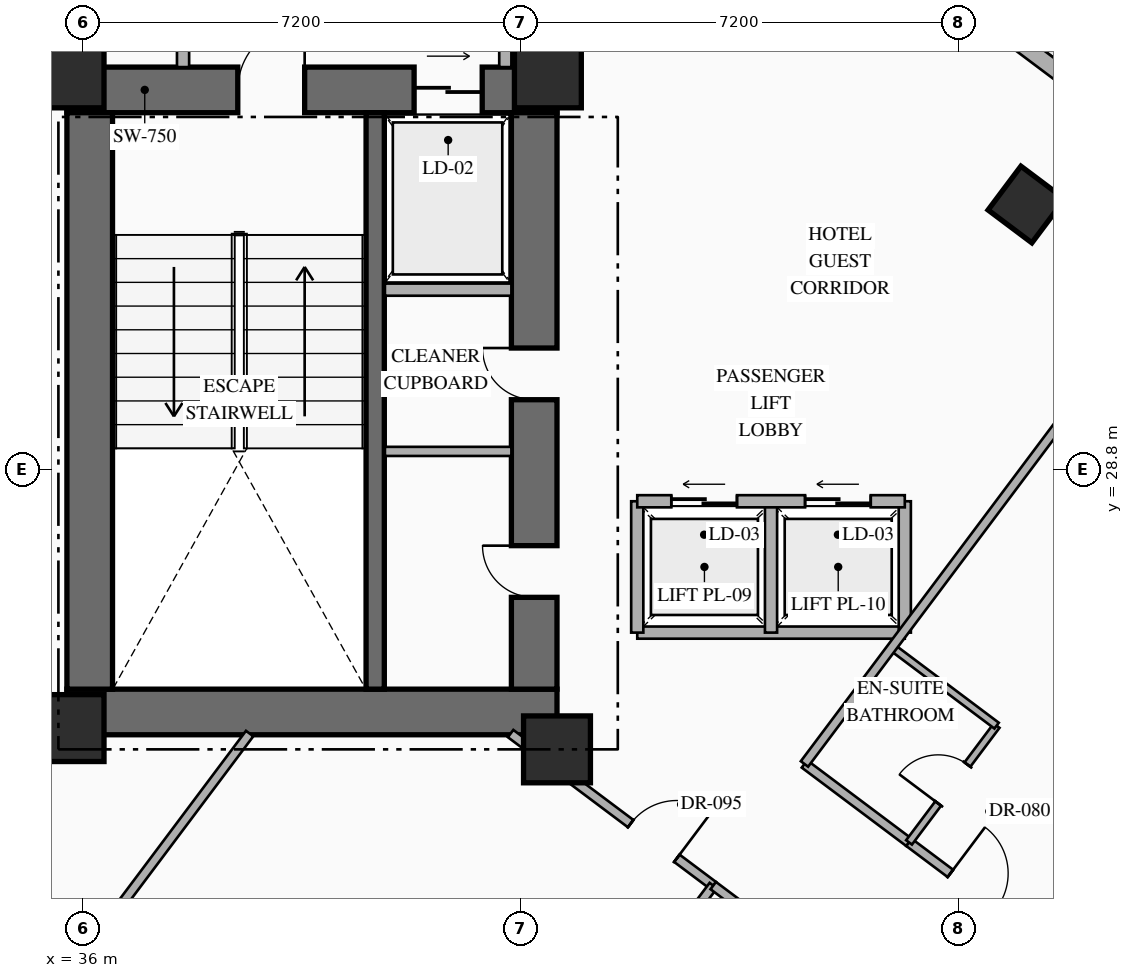
"""IFC4 building model, lengths in metres.
Left out: names, types, materials, properties, quantities, classifications, styles, units other than length and angle.
Written with IfcOpenShell. Run it as: python <this file> out.ifc"""

import sys

from ifc_helpers import new_model, si_unit, direction, frame, frame_2d, origin, origin_2d, place, context, subcontext, project, spatial, rectangle, hollow_rectangle, extrude, element, fill, save


model = new_model("IFC4")
c1 = context("Model", 3, precision=1e-05, world=origin(), true_north=direction((0.0, 1.0)))
c2 = subcontext(c1, "Body", "Model", "MODEL_VIEW")
j1 = project(units=[si_unit("LENGTHUNIT", "METRE"), si_unit("PLANEANGLEUNIT", "RADIAN")], contexts=[c1])
p1 = place(None, origin())
s1 = spatial("IfcSite", under=j1, at=p1, CompositionType="ELEMENT")
p2 = place(p1, origin())
s2 = spatial("IfcBuilding", under=s1, at=p2, CompositionType="ELEMENT")
p3 = place(p2, frame((0.0, 0.0, 74.6)))
s3 = spatial("IfcBuildingStorey", under=s2, at=p3, CompositionType="ELEMENT", Elevation=74.6)
p4 = place(p3, frame((35.74, 24.815, 0.0), z_axis=(0.0, 0.0, 1.0), x_axis=(1.0, 0.0, 0.0)))
e1 = element("IfcWall", 1, at=p4, inside=s3, PredefinedType="SHEAR", context=c2, shape_type="SweptSolid", body=[
    extrude(rectangle(XDim=8.06, YDim=0.75, at=frame_2d((4.03, 0.0))), origin(), (0.0, 0.0, 1.0), 3.35),
])
p5 = place(p3, frame((35.74, 35.045, 0.0), z_axis=(0.0, 0.0, 1.0), x_axis=(1.0, 0.0, 0.0)))
e2 = element("IfcWall", 2, at=p5, inside=s3, PredefinedType="SHEAR", context=c2, shape_type="SweptSolid", body=[
    extrude(rectangle(XDim=8.06, YDim=0.75, at=frame_2d((4.03, 0.0))), origin(), (0.0, 0.0, 1.0), 3.35),
])
p6 = place(p5, frame((2.81, 0.0, 0.0)))
e3 = element("IfcOpeningElement", 3, at=p6, cuts=e2, PredefinedType="OPENING", context=c2, shape_type="SweptSolid", body=[
    extrude(rectangle(XDim=1.1, YDim=2.2, at=frame_2d((0.55, 1.1))), frame((0.0, 0.385, 0.0), z_axis=(0.0, -1.0, 0.0), x_axis=(1.0, 0.0, 0.0)), (0.0, 0.0, 1.0), 0.77),
])
p7 = place(p5, frame((5.71, 0.0, 0.0)))
e4 = element("IfcOpeningElement", 4, at=p7, cuts=e2, PredefinedType="OPENING", context=c2, shape_type="SweptSolid", body=[
    extrude(rectangle(XDim=1.12, YDim=2.15, at=frame_2d((0.56, 1.075))), frame((0.0, 0.385, 0.0), z_axis=(0.0, -1.0, 0.0), x_axis=(1.0, 0.0, 0.0)), (0.0, 0.0, 1.0), 0.77),
])
p8 = place(p3, frame((36.115, 25.19, 0.0), z_axis=(0.0, 0.0, 1.0), x_axis=(0.0, 1.0, 0.0)))
e5 = element("IfcWall", 5, at=p8, inside=s3, PredefinedType="SHEAR", context=c2, shape_type="SweptSolid", body=[
    extrude(rectangle(XDim=9.48, YDim=0.75, at=frame_2d((4.74, 0.0))), origin(), (0.0, 0.0, 1.0), 3.35),
])
p9 = place(p3, frame((43.425, 25.19, 0.0), z_axis=(0.0, 0.0, 1.0), x_axis=(0.0, 1.0, 0.0)))
e6 = element("IfcWall", 6, at=p9, inside=s3, PredefinedType="SHEAR", context=c2, shape_type="SweptSolid", body=[
    extrude(rectangle(XDim=9.48, YDim=0.75, at=frame_2d((4.74, 0.0))), origin(), (0.0, 0.0, 1.0), 3.35),
])
p10 = place(p9, frame((1.51, 0.0, 0.0)))
e7 = element("IfcOpeningElement", 7, at=p10, cuts=e6, PredefinedType="OPENING", context=c2, shape_type="SweptSolid", body=[
    extrude(rectangle(XDim=0.85, YDim=2.08, at=frame_2d((0.425, 1.04))), frame((0.0, 0.385, 0.0), z_axis=(0.0, -1.0, 0.0), x_axis=(1.0, 0.0, 0.0)), (0.0, 0.0, 1.0), 0.77),
])
p11 = place(p9, frame((4.76, 0.0, 0.0)))
e8 = element("IfcOpeningElement", 8, at=p11, cuts=e6, PredefinedType="OPENING", context=c2, shape_type="SweptSolid", body=[
    extrude(rectangle(XDim=0.85, YDim=2.08, at=frame_2d((0.425, 1.04))), frame((0.0, 0.385, 0.0), z_axis=(0.0, -1.0, 0.0), x_axis=(1.0, 0.0, 0.0)), (0.0, 0.0, 1.0), 0.77),
])
p12 = place(p3, frame((40.81, 25.19, 0.0), z_axis=(0.0, 0.0, 1.0), x_axis=(0.0, 1.0, 0.0)))
e9 = element("IfcWall", 9, at=p12, inside=s3, PredefinedType="SHEAR", context=c2, shape_type="SweptSolid", body=[
    extrude(rectangle(XDim=9.48, YDim=0.3, at=frame_2d((4.74, 0.0))), origin(), (0.0, 0.0, 1.0), 3.35),
])
for number, where, z_axis, x_axis in (
    (10, (35.8, 24.55, 0.0), (0.0, 0.0, 1.0), (1.0, 0.0, 0.0)),
    (11, (43.8, 24.2, 0.0), (0.0, 0.0, 1.0), (1.0, 0.0, 0.0)),
    (12, (35.8, 35.3, 0.0), (0.0, 0.0, 1.0), (1.0, 0.0, 0.0)),
    (13, (43.65, 35.3, 0.0), (0.0, 0.0, 1.0), (1.0, 0.0, 0.0)),
):
    element("IfcColumn", number, at=place(p3, frame(where, z_axis=z_axis, x_axis=x_axis)), inside=s3, PredefinedType="COLUMN", context=c2, shape_type="SweptSolid", body=[
        extrude(rectangle(XDim=1.1, YDim=1.1, at=origin_2d()), origin(), (0.0, 0.0, 1.0), 3.35),
    ])
p13 = place(p3, frame((51.52, 33.16, 0.0), z_axis=(0.0, 0.0, 1.0), x_axis=(0.799999996291, -0.600000004945, 0.0)))
e14 = element("IfcColumn", 14, at=p13, inside=s3, PredefinedType="COLUMN", context=c2, shape_type="SweptSolid", body=[
    extrude(hollow_rectangle(XDim=0.9, YDim=0.9, WallThickness=0.036, at=origin_2d()), origin(), (0.0, 0.0, 1.0), 3.35),
])
p14 = place(p3, frame((44.86, 40.73, 0.0), z_axis=(0.0, 0.0, 1.0), x_axis=(0.800006902154, -0.599990797017, 0.0)))
e15 = element("IfcWall", 15, at=p14, inside=s3, PredefinedType="STANDARD", context=c2, shape_type="SweptSolid", body=[
    extrude(rectangle(XDim=29.712, YDim=0.28, at=frame_2d((14.856, 0.0))), origin(), (0.0, 0.0, 1.0), 3.13),
])
p15 = place(p14, frame((14.249, 0.0, 0.0)))
e16 = element("IfcOpeningElement", 16, at=p15, cuts=e15, PredefinedType="OPENING", context=c2, shape_type="SweptSolid", body=[
    extrude(rectangle(XDim=1.1, YDim=2.2, at=frame_2d((0.55, 1.1))), frame((0.0, 0.15, 0.0), z_axis=(0.0, -1.0, 0.0), x_axis=(1.0, 0.0, 0.0)), (0.0, 0.0, 1.0), 0.3),
])
p16 = place(p14, frame((1.612, 0.0, 0.85)))
e17 = element("IfcOpeningElement", 17, at=p16, cuts=e15, PredefinedType="OPENING", context=c2, shape_type="SweptSolid", body=[
    extrude(rectangle(XDim=1.4, YDim=1.8, at=frame_2d((0.7, 0.9))), frame((0.0, 0.15, 0.0), z_axis=(0.0, -1.0, 0.0), x_axis=(1.0, 0.0, 0.0)), (0.0, 0.0, 1.0), 0.3),
])
p17 = place(p14, frame((5.667, 0.0, 0.85)))
e18 = element("IfcOpeningElement", 18, at=p17, cuts=e15, PredefinedType="OPENING", context=c2, shape_type="SweptSolid", body=[
    extrude(rectangle(XDim=1.4, YDim=1.8, at=frame_2d((0.7, 0.9))), frame((0.0, 0.15, 0.0), z_axis=(0.0, -1.0, 0.0), x_axis=(1.0, 0.0, 0.0)), (0.0, 0.0, 1.0), 0.3),
])
p18 = place(p14, frame((9.912, 0.0, 0.85)))
e19 = element("IfcOpeningElement", 19, at=p18, cuts=e15, PredefinedType="OPENING", context=c2, shape_type="SweptSolid", body=[
    extrude(rectangle(XDim=1.4, YDim=1.8, at=frame_2d((0.7, 0.9))), frame((0.0, 0.15, 0.0), z_axis=(0.0, -1.0, 0.0), x_axis=(1.0, 0.0, 0.0)), (0.0, 0.0, 1.0), 0.3),
])
p19 = place(p14, frame((19.528, 0.0, 0.85)))
e20 = element("IfcOpeningElement", 20, at=p19, cuts=e15, PredefinedType="OPENING", context=c2, shape_type="SweptSolid", body=[
    extrude(rectangle(XDim=1.4, YDim=1.8, at=frame_2d((0.7, 0.9))), frame((0.0, 0.15, 0.0), z_axis=(0.0, -1.0, 0.0), x_axis=(1.0, 0.0, 0.0)), (0.0, 0.0, 1.0), 0.3),
])
p20 = place(p14, frame((23.451, 0.0, 0.85)))
e21 = element("IfcOpeningElement", 21, at=p20, cuts=e15, PredefinedType="OPENING", context=c2, shape_type="SweptSolid", body=[
    extrude(rectangle(XDim=1.4, YDim=1.8, at=frame_2d((0.7, 0.9))), frame((0.0, 0.15, 0.0), z_axis=(0.0, -1.0, 0.0), x_axis=(1.0, 0.0, 0.0)), (0.0, 0.0, 1.0), 0.3),
])
p21 = place(p14, frame((27.852, 0.0, 0.85)))
e22 = element("IfcOpeningElement", 22, at=p21, cuts=e15, PredefinedType="OPENING", context=c2, shape_type="SweptSolid", body=[
    extrude(rectangle(XDim=1.4, YDim=1.8, at=frame_2d((0.7, 0.9))), frame((0.0, 0.15, 0.0), z_axis=(0.0, -1.0, 0.0), x_axis=(1.0, 0.0, 0.0)), (0.0, 0.0, 1.0), 0.3),
])
p22 = place(p3, frame((53.318, 2.487, 0.0), z_axis=(0.0, 0.0, 1.0), x_axis=(-0.800004174678, 0.599994433723, 0.0)))
e23 = element("IfcWall", 23, at=p22, inside=s3, PredefinedType="STANDARD", context=c2, shape_type="SweptSolid", body=[
    extrude(rectangle(XDim=35.089, YDim=0.28, at=frame_2d((17.544, 0.0))), origin(), (0.0, 0.0, 1.0), 3.13),
])
p23 = place(p22, frame((1.931, 0.0, 0.85)))
e24 = element("IfcOpeningElement", 24, at=p23, cuts=e23, PredefinedType="OPENING", context=c2, shape_type="SweptSolid", body=[
    extrude(rectangle(XDim=1.4, YDim=1.8, at=frame_2d((0.7, 0.9))), frame((0.0, 0.15, 0.0), z_axis=(0.0, -1.0, 0.0), x_axis=(1.0, 0.0, 0.0)), (0.0, 0.0, 1.0), 0.3),
])
p24 = place(p22, frame((6.819, 0.0, 0.85)))
e25 = element("IfcOpeningElement", 25, at=p24, cuts=e23, PredefinedType="OPENING", context=c2, shape_type="SweptSolid", body=[
    extrude(rectangle(XDim=1.4, YDim=1.8, at=frame_2d((0.7, 0.9))), frame((0.0, 0.15, 0.0), z_axis=(0.0, -1.0, 0.0), x_axis=(1.0, 0.0, 0.0)), (0.0, 0.0, 1.0), 0.3),
])
p25 = place(p22, frame((11.832, 0.0, 0.85)))
e26 = element("IfcOpeningElement", 26, at=p25, cuts=e23, PredefinedType="OPENING", context=c2, shape_type="SweptSolid", body=[
    extrude(rectangle(XDim=1.4, YDim=1.8, at=frame_2d((0.7, 0.9))), frame((0.0, 0.15, 0.0), z_axis=(0.0, -1.0, 0.0), x_axis=(1.0, 0.0, 0.0)), (0.0, 0.0, 1.0), 0.3),
])
p26 = place(p22, frame((17.647, 0.0, 0.85)))
e27 = element("IfcOpeningElement", 27, at=p26, cuts=e23, PredefinedType="OPENING", context=c2, shape_type="SweptSolid", body=[
    extrude(rectangle(XDim=1.4, YDim=1.8, at=frame_2d((0.7, 0.9))), frame((0.0, 0.15, 0.0), z_axis=(0.0, -1.0, 0.0), x_axis=(1.0, 0.0, 0.0)), (0.0, 0.0, 1.0), 0.3),
])
p27 = place(p22, frame((21.857, 0.0, 0.85)))
e28 = element("IfcOpeningElement", 28, at=p27, cuts=e23, PredefinedType="OPENING", context=c2, shape_type="SweptSolid", body=[
    extrude(rectangle(XDim=1.4, YDim=1.8, at=frame_2d((0.7, 0.9))), frame((0.0, 0.15, 0.0), z_axis=(0.0, -1.0, 0.0), x_axis=(1.0, 0.0, 0.0)), (0.0, 0.0, 1.0), 0.3),
])
p28 = place(p22, frame((26.87, 0.0, 0.85)))
e29 = element("IfcOpeningElement", 29, at=p28, cuts=e23, PredefinedType="OPENING", context=c2, shape_type="SweptSolid", body=[
    extrude(rectangle(XDim=1.4, YDim=1.8, at=frame_2d((0.7, 0.9))), frame((0.0, 0.15, 0.0), z_axis=(0.0, -1.0, 0.0), x_axis=(1.0, 0.0, 0.0)), (0.0, 0.0, 1.0), 0.3),
])
p29 = place(p22, frame((31.757, 0.0, 0.85)))
e30 = element("IfcOpeningElement", 30, at=p29, cuts=e23, PredefinedType="OPENING", context=c2, shape_type="SweptSolid", body=[
    extrude(rectangle(XDim=1.4, YDim=1.8, at=frame_2d((0.7, 0.9))), frame((0.0, 0.15, 0.0), z_axis=(0.0, -1.0, 0.0), x_axis=(1.0, 0.0, 0.0)), (0.0, 0.0, 1.0), 0.3),
])
p30 = place(p3, frame((40.97, 31.76, 0.0), z_axis=(0.0, 0.0, 1.0), x_axis=(1.0, 0.0, 0.0)))
e31 = element("IfcWall", 31, at=p30, inside=s3, PredefinedType="STANDARD", context=c2, shape_type="SweptSolid", body=[
    extrude(rectangle(XDim=2.08, YDim=0.2, at=frame_2d((1.04, 0.0))), origin(), (0.0, 0.0, 1.0), 3.13),
])
p31 = place(p3, frame((40.97, 29.1, 0.0), z_axis=(0.0, 0.0, 1.0), x_axis=(1.0, 0.0, 0.0)))
e32 = element("IfcWall", 32, at=p31, inside=s3, PredefinedType="PARTITIONING", context=c2, shape_type="SweptSolid", body=[
    extrude(rectangle(XDim=2.08, YDim=0.15, at=frame_2d((1.04, 0.0))), origin(), (0.0, 0.0, 1.0), 3.13),
])
p32 = place(p3, frame((42.95, 35.42, 0.0), z_axis=(0.0, 0.0, 1.0), x_axis=(0.0, 1.0, 0.0)))
e33 = element("IfcWall", 33, at=p32, inside=s3, PredefinedType="STANDARD", context=c2, shape_type="SweptSolid", body=[
    extrude(rectangle(XDim=2.68, YDim=0.2, at=frame_2d((1.34, 0.0))), origin(), (0.0, 0.0, 1.0), 3.13),
])
p33 = place(p3, frame((37.65, 35.42, 0.0), z_axis=(0.0, 0.0, 1.0), x_axis=(0.0, 1.0, 0.0)))
e34 = element("IfcWall", 34, at=p33, inside=s3, PredefinedType="STANDARD", context=c2, shape_type="SweptSolid", body=[
    extrude(rectangle(XDim=2.68, YDim=0.2, at=frame_2d((1.34, 0.0))), origin(), (0.0, 0.0, 1.0), 3.13),
])
p34 = place(p33, frame((0.84, 0.0, 0.0)))
e35 = element("IfcOpeningElement", 35, at=p34, cuts=e34, PredefinedType="OPENING", context=c2, shape_type="SweptSolid", body=[
    extrude(rectangle(XDim=1.0, YDim=2.2, at=frame_2d((0.5, 1.1))), frame((0.0, 0.11, 0.0), z_axis=(0.0, -1.0, 0.0), x_axis=(1.0, 0.0, 0.0)), (0.0, 0.0, 1.0), 0.22),
])
p35 = place(p3, frame((45.12, 26.12, 0.0), z_axis=(0.0, 0.0, 1.0), x_axis=(1.0, 0.0, 0.0)))
e36 = element("IfcWall", 36, at=p35, inside=s3, PredefinedType="STANDARD", context=c2, shape_type="SweptSolid", body=[
    extrude(rectangle(XDim=4.4, YDim=0.2, at=frame_2d((2.2, 0.0))), origin(), (0.0, 0.0, 1.0), 3.13),
])
for number, where, z_axis, x_axis in (
    (37, (45.12, 26.12, 0.0), (0.0, 0.0, 1.0), (0.0, 1.0, 0.0)),
    (38, (49.52, 26.12, 0.0), (0.0, 0.0, 1.0), (0.0, 1.0, 0.0)),
    (39, (47.32, 26.12, 0.0), (0.0, 0.0, 1.0), (0.0, 1.0, 0.0)),
):
    element("IfcWall", number, at=place(p3, frame(where, z_axis=z_axis, x_axis=x_axis)), inside=s3, PredefinedType="STANDARD", context=c2, shape_type="SweptSolid", body=[
        extrude(rectangle(XDim=2.16, YDim=0.2, at=frame_2d((1.08, 0.0))), origin(), (0.0, 0.0, 1.0), 3.13),
    ])
p36 = place(p3, frame((45.12, 28.28, 0.0), z_axis=(0.0, 0.0, 1.0), x_axis=(1.0, 0.0, 0.0)))
e40 = element("IfcWall", 40, at=p36, inside=s3, PredefinedType="STANDARD", context=c2, shape_type="SweptSolid", body=[
    extrude(rectangle(XDim=4.4, YDim=0.2, at=frame_2d((2.2, 0.0))), origin(), (0.0, 0.0, 1.0), 3.13),
])
p37 = place(p36, frame((0.56, 0.0, 0.0)))
e41 = element("IfcOpeningElement", 41, at=p37, cuts=e40, PredefinedType="OPENING", context=c2, shape_type="SweptSolid", body=[
    extrude(rectangle(XDim=1.08, YDim=2.15, at=frame_2d((0.54, 1.075))), frame((0.0, 0.11, 0.0), z_axis=(0.0, -1.0, 0.0), x_axis=(1.0, 0.0, 0.0)), (0.0, 0.0, 1.0), 0.22),
])
p38 = place(p36, frame((2.76, 0.0, 0.0)))
e42 = element("IfcOpeningElement", 42, at=p38, cuts=e40, PredefinedType="OPENING", context=c2, shape_type="SweptSolid", body=[
    extrude(rectangle(XDim=1.08, YDim=2.15, at=frame_2d((0.54, 1.075))), frame((0.0, 0.11, 0.0), z_axis=(0.0, -1.0, 0.0), x_axis=(1.0, 0.0, 0.0)), (0.0, 0.0, 1.0), 0.22),
])
p39 = place(p3, frame((43.037, 24.46, 0.0), z_axis=(0.0, 0.0, 1.0), x_axis=(0.799971872363, -0.600037501685, 0.0)))
e43 = element("IfcWall", 43, at=p39, inside=s3, PredefinedType="PARTITIONING", context=c2, shape_type="SweptSolid", body=[
    extrude(rectangle(XDim=4.167, YDim=0.15, at=frame_2d((2.083, 0.0))), origin(), (0.0, 0.0, 1.0), 2.425),
])
p40 = place(p39, frame((2.468, 0.0, 0.0)))
e44 = element("IfcOpeningElement", 44, at=p40, cuts=e43, PredefinedType="OPENING", context=c2, shape_type="SweptSolid", body=[
    extrude(rectangle(XDim=0.95, YDim=2.15, at=frame_2d((0.475, 1.075))), frame((0.0, 0.085, 0.0), z_axis=(0.0, -1.0, 0.0), x_axis=(1.0, 0.0, 0.0)), (0.0, 0.0, 1.0), 0.17),
])
p41 = place(p3, frame((33.384, 17.312, 0.0), z_axis=(0.0, 0.0, 1.0), x_axis=(0.600008743659, 0.799993442181, 0.0)))
e45 = element("IfcWall", 45, at=p41, inside=s3, PredefinedType="PARTITIONING", context=c2, shape_type="SweptSolid", body=[
    extrude(rectangle(XDim=8.935, YDim=0.15, at=frame_2d((4.468, 0.0))), origin(), (0.0, 0.0, 1.0), 3.13),
])
p42 = place(p3, frame((39.464, 12.752, 0.0), z_axis=(0.0, 0.0, 1.0), x_axis=(0.6, 0.8, 0.0)))
e46 = element("IfcWall", 46, at=p42, inside=s3, PredefinedType="PARTITIONING", context=c2, shape_type="SweptSolid", body=[
    extrude(rectangle(XDim=11.51, YDim=0.15, at=frame_2d((5.755, 0.0))), origin(), (0.0, 0.0, 1.0), 3.13),
])
p43 = place(p3, frame((47.87, 23.96, 0.0), z_axis=(0.0, 0.0, 1.0), x_axis=(0.79998637334, -0.60001816845, 0.0)))
e47 = element("IfcWall", 47, at=p43, inside=s3, PredefinedType="PARTITIONING", context=c2, shape_type="SweptSolid", body=[
    extrude(rectangle(XDim=2.15, YDim=0.15, at=frame_2d((1.075, 0.0))), origin(), (0.0, 0.0, 1.0), 2.775),
])
p44 = place(p3, frame((49.59, 22.67, 0.0), z_axis=(0.0, 0.0, 1.0), x_axis=(0.800011056104, -0.599985258246, 0.0)))
e48 = element("IfcWall", 48, at=p44, inside=s3, PredefinedType="PARTITIONING", context=c2, shape_type="SweptSolid", body=[
    extrude(rectangle(XDim=2.65, YDim=0.15, at=frame_2d((1.325, 0.0))), origin(), (0.0, 0.0, 1.0), 2.775),
])
p45 = place(p44, frame((0.85, 0.0, 0.0)))
e49 = element("IfcOpeningElement", 49, at=p45, cuts=e48, PredefinedType="OPENING", context=c2, shape_type="SweptSolid", body=[
    extrude(rectangle(XDim=0.95, YDim=2.15, at=frame_2d((0.475, 1.075))), frame((0.0, 0.085, 0.0), z_axis=(0.0, -1.0, 0.0), x_axis=(1.0, 0.0, 0.0)), (0.0, 0.0, 1.0), 0.17),
])
p46 = place(p3, frame((49.59, 22.67, 0.0), z_axis=(0.0, 0.0, 1.0), x_axis=(0.599951172744, 0.800036618114, 0.0)))
e50 = element("IfcWall", 50, at=p46, inside=s3, PredefinedType="PARTITIONING", context=c2, shape_type="SweptSolid", body=[
    extrude(rectangle(XDim=2.4, YDim=0.12, at=frame_2d((1.2, 0.0))), origin(), (0.0, 0.0, 1.0), 3.13),
])
p47 = place(p46, frame((0.8, 0.0, 0.0)))
e51 = element("IfcOpeningElement", 51, at=p47, cuts=e50, PredefinedType="OPENING", context=c2, shape_type="SweptSolid", body=[
    extrude(rectangle(XDim=0.8, YDim=2.06, at=frame_2d((0.4, 1.03))), frame((0.0, 0.07, 0.0), z_axis=(0.0, -1.0, 0.0), x_axis=(1.0, 0.0, 0.0)), (0.0, 0.0, 1.0), 0.14),
])
p48 = place(p3, frame((49.31, 25.88, 0.0), z_axis=(0.0, 0.0, 1.0), x_axis=(0.800040880289, -0.59994548908, 0.0)))
e52 = element("IfcWall", 52, at=p48, inside=s3, PredefinedType="PARTITIONING", context=c2, shape_type="SweptSolid", body=[
    extrude(rectangle(XDim=2.15, YDim=0.12, at=frame_2d((1.075, 0.0))), origin(), (0.0, 0.0, 1.0), 3.13),
])
for number, where, z_axis, x_axis in (
    (53, (47.87, 23.96, 0.0), (0.0, 0.0, 1.0), (0.6, 0.8, 0.0)),
    (54, (51.71, 21.08, 0.0), (0.0, 0.0, 1.0), (0.6, 0.8, 0.0)),
):
    element("IfcWall", number, at=place(p3, frame(where, z_axis=z_axis, x_axis=x_axis)), inside=s3, PredefinedType="PARTITIONING", context=c2, shape_type="SweptSolid", body=[
        extrude(rectangle(XDim=11.55, YDim=0.15, at=frame_2d((5.775, 0.0))), origin(), (0.0, 0.0, 1.0), 3.13),
    ])
p49 = place(p3, frame((46.37, 21.96, 0.0), z_axis=(0.0, 0.0, 1.0), x_axis=(0.799977170108, -0.600030438649, 0.0)))
e55 = element("IfcWall", 55, at=p49, inside=s3, PredefinedType="PARTITIONING", context=c2, shape_type="SweptSolid", body=[
    extrude(rectangle(XDim=3.85, YDim=0.15, at=frame_2d((1.925, 0.0))), origin(), (0.0, 0.0, 1.0), 2.425),
])
p50 = place(p49, frame((1.45, 0.0, 0.0)))
e56 = element("IfcOpeningElement", 56, at=p50, cuts=e55, PredefinedType="OPENING", context=c2, shape_type="SweptSolid", body=[
    extrude(rectangle(XDim=0.95, YDim=2.15, at=frame_2d((0.475, 1.075))), frame((0.0, 0.085, 0.0), z_axis=(0.0, -1.0, 0.0), x_axis=(1.0, 0.0, 0.0)), (0.0, 0.0, 1.0), 0.17),
])
p51 = place(p6, origin())
e57 = element("IfcDoor", 57, at=p51, inside=s3, OperationType="SINGLE_SWING_RIGHT", PredefinedType="DOOR", context=c2, shape_type="SweptSolid", body=[
    extrude(rectangle(XDim=1.1, YDim=2.2, at=frame_2d((0.55, 1.1))), frame((0.0, 0.025, 0.0), z_axis=(0.0, -1.0, 0.0), x_axis=(1.0, 0.0, 0.0)), (0.0, 0.0, 1.0), 0.05),
])
fill(e3, e57)
p52 = place(p7, origin())
e58 = element("IfcDoor", 58, at=p52, inside=s3, OperationType="SLIDING_TO_RIGHT", PredefinedType="USERDEFINED", context=c2, shape_type="SweptSolid", body=[
    extrude(rectangle(XDim=1.12, YDim=2.15, at=frame_2d((0.56, 1.075))), frame((0.0, 0.025, 0.0), z_axis=(0.0, -1.0, 0.0), x_axis=(1.0, 0.0, 0.0)), (0.0, 0.0, 1.0), 0.05),
])
fill(e4, e58)
p53 = place(p10, origin())
e59 = element("IfcDoor", 59, at=p53, inside=s3, OperationType="SINGLE_SWING_RIGHT", PredefinedType="DOOR", context=c2, shape_type="SweptSolid", body=[
    extrude(rectangle(XDim=0.85, YDim=2.08, at=frame_2d((0.425, 1.04))), frame((0.0, 0.025, 0.0), z_axis=(0.0, -1.0, 0.0), x_axis=(1.0, 0.0, 0.0)), (0.0, 0.0, 1.0), 0.05),
])
fill(e7, e59)
p54 = place(p11, origin())
e60 = element("IfcDoor", 60, at=p54, inside=s3, OperationType="SINGLE_SWING_RIGHT", PredefinedType="DOOR", context=c2, shape_type="SweptSolid", body=[
    extrude(rectangle(XDim=0.85, YDim=2.08, at=frame_2d((0.425, 1.04))), frame((0.0, 0.025, 0.0), z_axis=(0.0, -1.0, 0.0), x_axis=(1.0, 0.0, 0.0)), (0.0, 0.0, 1.0), 0.05),
])
fill(e8, e60)
p55 = place(p37, origin())
e61 = element("IfcDoor", 61, at=p55, inside=s3, OperationType="SLIDING_TO_LEFT", PredefinedType="USERDEFINED", context=c2, shape_type="SweptSolid", body=[
    extrude(rectangle(XDim=1.08, YDim=2.15, at=frame_2d((0.54, 1.075))), frame((0.0, 0.025, 0.0), z_axis=(0.0, -1.0, 0.0), x_axis=(1.0, 0.0, 0.0)), (0.0, 0.0, 1.0), 0.05),
])
fill(e41, e61)
p56 = place(p38, origin())
e62 = element("IfcDoor", 62, at=p56, inside=s3, OperationType="SLIDING_TO_LEFT", PredefinedType="USERDEFINED", context=c2, shape_type="SweptSolid", body=[
    extrude(rectangle(XDim=1.08, YDim=2.15, at=frame_2d((0.54, 1.075))), frame((0.0, 0.025, 0.0), z_axis=(0.0, -1.0, 0.0), x_axis=(1.0, 0.0, 0.0)), (0.0, 0.0, 1.0), 0.05),
])
fill(e42, e62)
p57 = place(p40, origin())
e63 = element("IfcDoor", 63, at=p57, inside=s3, OperationType="SINGLE_SWING_RIGHT", PredefinedType="DOOR", context=c2, shape_type="SweptSolid", body=[
    extrude(rectangle(XDim=0.95, YDim=2.15, at=frame_2d((0.475, 1.075))), frame((0.0, 0.025, 0.0), z_axis=(0.0, -1.0, 0.0), x_axis=(1.0, 0.0, 0.0)), (0.0, 0.0, 1.0), 0.05),
])
fill(e44, e63)
p58 = place(p45, origin())
e64 = element("IfcDoor", 64, at=p58, inside=s3, OperationType="SINGLE_SWING_LEFT", PredefinedType="DOOR", context=c2, shape_type="SweptSolid", body=[
    extrude(rectangle(XDim=0.95, YDim=2.15, at=frame_2d((0.475, 1.075))), frame((0.0, 0.025, 0.0), z_axis=(0.0, -1.0, 0.0), x_axis=(1.0, 0.0, 0.0)), (0.0, 0.0, 1.0), 0.05),
])
fill(e49, e64)
p59 = place(p47, origin())
e65 = element("IfcDoor", 65, at=p59, inside=s3, OperationType="SINGLE_SWING_LEFT", PredefinedType="DOOR", context=c2, shape_type="SweptSolid", body=[
    extrude(rectangle(XDim=0.8, YDim=2.06, at=frame_2d((0.4, 1.03))), frame((0.0, 0.025, 0.0), z_axis=(0.0, -1.0, 0.0), x_axis=(1.0, 0.0, 0.0)), (0.0, 0.0, 1.0), 0.05),
])
fill(e51, e65)
save(model, sys.argv[1])
